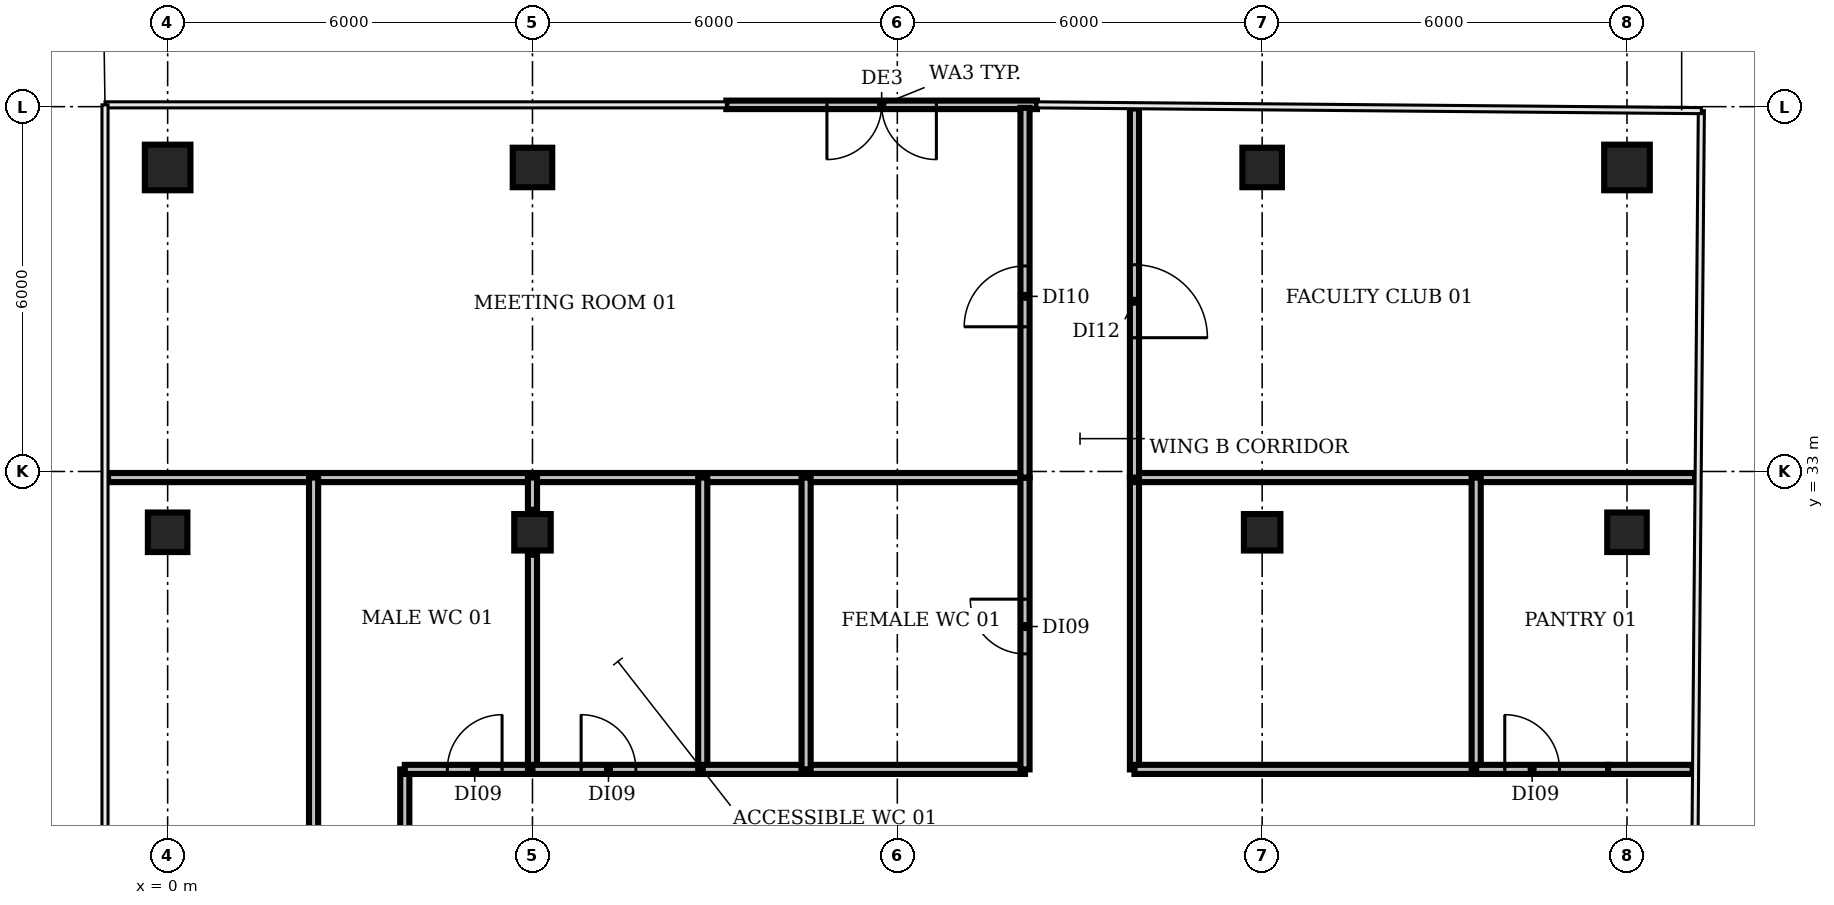
"""IFC4 building model, lengths in metres.
Left out: names, types, materials, properties, quantities, classifications, styles, units other than length and angle.
Written with IfcOpenShell. Run it as: python <this file> out.ifc"""

import sys

from ifc_helpers import new_model, si_unit, direction, frame, frame_2d, origin, origin_2d, place, context, subcontext, project, spatial, rectangle, circle, extrude, element, fill, save


model = new_model("IFC4")
c1 = context("Model", 3, precision=1e-05, world=origin(), true_north=direction((0.0, 1.0)))
c2 = subcontext(c1, "Body", "Model", "MODEL_VIEW")
j1 = project(units=[si_unit("LENGTHUNIT", "METRE"), si_unit("PLANEANGLEUNIT", "RADIAN")], contexts=[c1])
p1 = place(None, origin())
s1 = spatial("IfcSite", under=j1, at=p1, CompositionType="ELEMENT")
p2 = place(p1, origin())
s2 = spatial("IfcBuilding", under=s1, at=p2, CompositionType="ELEMENT")
p3 = place(p2, frame((0.0, 0.0, 335.6)))
s3 = spatial("IfcBuildingStorey", under=s2, at=p3, CompositionType="ELEMENT", Elevation=335.6)
p4 = place(p3, frame((0.0, 32.0, 0.0), z_axis=(0.0, 0.0, 1.0), x_axis=(1.0, 0.0, 0.0)))
e1 = element("IfcColumn", 1, at=p4, inside=s3, PredefinedType="COLUMN", context=c2, shape_type="SweptSolid", body=[
    extrude(rectangle(XDim=0.65, YDim=0.65, at=origin_2d()), origin(), (0.0, 0.0, 1.0), 3.9),
])
p5 = place(p3, frame((0.0, 38.0, 0.0), z_axis=(0.0, 0.0, 1.0), x_axis=(1.0, 0.0, 0.0)))
e2 = element("IfcColumn", 2, at=p5, inside=s3, PredefinedType="COLUMN", context=c2, shape_type="SweptSolid", body=[
    extrude(circle(Radius=0.375, at=origin_2d()), origin(), (0.0, 0.0, 1.0), 3.9),
])
p6 = place(p3, frame((6.0, 32.0, 0.0), z_axis=(0.0, 0.0, 1.0), x_axis=(1.0, 0.0, 0.0)))
e3 = element("IfcColumn", 3, at=p6, inside=s3, PredefinedType="COLUMN", context=c2, shape_type="SweptSolid", body=[
    extrude(rectangle(XDim=0.6, YDim=0.6, at=origin_2d()), origin(), (0.0, 0.0, 1.0), 3.9),
])
p7 = place(p3, frame((6.0, 38.0, 0.0), z_axis=(0.0, 0.0, 1.0), x_axis=(1.0, 0.0, 0.0)))
e4 = element("IfcColumn", 4, at=p7, inside=s3, PredefinedType="COLUMN", context=c2, shape_type="SweptSolid", body=[
    extrude(rectangle(XDim=0.65, YDim=0.65, at=origin_2d()), origin(), (0.0, 0.0, 1.0), 3.9),
])
p8 = place(p3, frame((18.0, 32.0, 0.0), z_axis=(0.0, 0.0, 1.0), x_axis=(1.0, 0.0, 0.0)))
e5 = element("IfcColumn", 5, at=p8, inside=s3, PredefinedType="COLUMN", context=c2, shape_type="SweptSolid", body=[
    extrude(rectangle(XDim=0.6, YDim=0.6, at=origin_2d()), origin(), (0.0, 0.0, 1.0), 3.9),
])
for number, where, z_axis, x_axis in (
    (6, (18.0, 38.0, 0.0), (0.0, 0.0, 1.0), (1.0, 0.0, 0.0)),
    (7, (24.0, 32.0, 0.0), (0.0, 0.0, 1.0), (1.0, 0.0, 0.0)),
):
    element("IfcColumn", number, at=place(p3, frame(where, z_axis=z_axis, x_axis=x_axis)), inside=s3, PredefinedType="COLUMN", context=c2, shape_type="SweptSolid", body=[
        extrude(rectangle(XDim=0.65, YDim=0.65, at=origin_2d()), origin(), (0.0, 0.0, 1.0), 3.9),
    ])
p9 = place(p3, frame((24.0, 38.0, 0.0), z_axis=(0.0, 0.0, 1.0), x_axis=(1.0, 0.0, 0.0)))
e8 = element("IfcColumn", 8, at=p9, inside=s3, PredefinedType="COLUMN", context=c2, shape_type="SweptSolid", body=[
    extrude(circle(Radius=0.375, at=origin_2d()), origin(), (0.0, 0.0, 1.0), 3.9),
])
p10 = place(p3, frame((14.297, 39.03, 0.0), z_axis=(0.0, 0.0, 1.0), x_axis=(-1.0, 0.0, 0.0)))
e9 = element("IfcWall", 9, at=p10, inside=s3, PredefinedType="SOLIDWALL", context=c2, shape_type="SweptSolid", body=[
    extrude(rectangle(XDim=5.109, YDim=0.14, at=frame_2d((2.555, 0.0))), origin(), (0.0, 0.0, 1.0), 3.9),
])
p11 = place(p10, frame((1.655, 0.0, 0.0)))
e10 = element("IfcOpeningElement", 10, at=p11, cuts=e9, PredefinedType="OPENING", context=c2, shape_type="SweptSolid", body=[
    extrude(rectangle(XDim=1.8, YDim=2.4, at=frame_2d((0.9, 1.2))), frame((0.0, 0.08, 0.0), z_axis=(0.0, -1.0, 0.0), x_axis=(1.0, 0.0, 0.0)), (0.0, 0.0, 1.0), 0.16),
])
p12 = place(p3, frame((-0.98, 32.9, 0.0), z_axis=(0.0, 0.0, 1.0), x_axis=(1.0, 0.0, 0.0)))
e11 = element("IfcWall", 11, at=p12, inside=s3, PredefinedType="PARTITIONING", context=c2, shape_type="SweptSolid", body=[
    extrude(rectangle(XDim=15.08, YDim=0.15, at=frame_2d((7.54, 0.0))), origin(), (0.0, 0.0, 1.0), 2.95),
])
p13 = place(p3, frame((2.4, 26.9, 0.0), z_axis=(0.0, 0.0, 1.0), x_axis=(0.0, 1.0, 0.0)))
e12 = element("IfcWall", 12, at=p13, inside=s3, PredefinedType="PARTITIONING", context=c2, shape_type="SweptSolid", body=[
    extrude(rectangle(XDim=6.0, YDim=0.15, at=frame_2d((3.0, 0.0))), origin(), (0.0, 0.0, 1.0), 2.95),
])
p14 = place(p3, frame((3.9, 22.5, 0.0), z_axis=(0.0, 0.0, 1.0), x_axis=(0.0, 1.0, 0.0)))
e13 = element("IfcWall", 13, at=p14, inside=s3, PredefinedType="PARTITIONING", context=c2, shape_type="SweptSolid", body=[
    extrude(rectangle(XDim=5.6, YDim=0.15, at=frame_2d((2.8, 0.0))), origin(), (0.0, 0.0, 1.0), 2.95),
])
p15 = place(p3, frame((3.9, 28.1, 0.0), z_axis=(0.0, 0.0, 1.0), x_axis=(1.0, 0.0, 0.0)))
e14 = element("IfcWall", 14, at=p15, inside=s3, PredefinedType="PARTITIONING", context=c2, shape_type="SweptSolid", body=[
    extrude(rectangle(XDim=2.1, YDim=0.15, at=frame_2d((1.05, 0.0))), origin(), (0.0, 0.0, 1.0), 2.95),
])
p16 = place(p15, frame((0.7, 0.0, 0.0)))
e15 = element("IfcOpeningElement", 15, at=p16, cuts=e14, PredefinedType="OPENING", context=c2, shape_type="SweptSolid", body=[
    extrude(rectangle(XDim=0.9, YDim=2.1, at=frame_2d((0.45, 1.05))), frame((0.0, 0.085, 0.0), z_axis=(0.0, -1.0, 0.0), x_axis=(1.0, 0.0, 0.0)), (0.0, 0.0, 1.0), 0.17),
])
p17 = place(p3, frame((6.0, 28.1, 0.0), z_axis=(0.0, 0.0, 1.0), x_axis=(0.0, 1.0, 0.0)))
e16 = element("IfcWall", 16, at=p17, inside=s3, PredefinedType="PARTITIONING", context=c2, shape_type="SweptSolid", body=[
    extrude(rectangle(XDim=3.53, YDim=0.15, at=frame_2d((1.765, 0.0))), origin(), (0.0, 0.0, 1.0), 2.95),
])
p18 = place(p3, frame((6.0, 28.1, 0.0), z_axis=(0.0, 0.0, 1.0), x_axis=(1.0, 0.0, 0.0)))
e17 = element("IfcWall", 17, at=p18, inside=s3, PredefinedType="PARTITIONING", context=c2, shape_type="SweptSolid", body=[
    extrude(rectangle(XDim=2.8, YDim=0.15, at=frame_2d((1.4, 0.0))), origin(), (0.0, 0.0, 1.0), 2.95),
])
p19 = place(p18, frame((0.8, 0.0, 0.0)))
e18 = element("IfcOpeningElement", 18, at=p19, cuts=e17, PredefinedType="OPENING", context=c2, shape_type="SweptSolid", body=[
    extrude(rectangle(XDim=0.9, YDim=2.1, at=frame_2d((0.45, 1.05))), frame((0.0, 0.085, 0.0), z_axis=(0.0, -1.0, 0.0), x_axis=(1.0, 0.0, 0.0)), (0.0, 0.0, 1.0), 0.17),
])
p20 = place(p3, frame((6.0, 31.736, 0.0), z_axis=(0.0, 0.0, 1.0), x_axis=(0.0, 1.0, 0.0)))
e19 = element("IfcWall", 19, at=p20, inside=s3, PredefinedType="PARTITIONING", context=c2, shape_type="SweptSolid", body=[
    extrude(rectangle(XDim=0.529, YDim=0.15, at=frame_2d((0.264, 0.0))), origin(), (0.0, 0.0, 1.0), 2.95),
])
p21 = place(p3, frame((6.0, 32.37, 0.0), z_axis=(0.0, 0.0, 1.0), x_axis=(0.0, 1.0, 0.0)))
e20 = element("IfcWall", 20, at=p21, inside=s3, PredefinedType="PARTITIONING", context=c2, shape_type="SweptSolid", body=[
    extrude(rectangle(XDim=0.53, YDim=0.15, at=frame_2d((0.265, 0.0))), origin(), (0.0, 0.0, 1.0), 2.95),
])
p22 = place(p3, frame((8.8, 28.1, 0.0), z_axis=(0.0, 0.0, 1.0), x_axis=(0.0, 1.0, 0.0)))
e21 = element("IfcWall", 21, at=p22, inside=s3, PredefinedType="PARTITIONING", context=c2, shape_type="SweptSolid", body=[
    extrude(rectangle(XDim=4.8, YDim=0.15, at=frame_2d((2.4, 0.0))), origin(), (0.0, 0.0, 1.0), 2.95),
])
p23 = place(p3, frame((8.8, 28.1, 0.0), z_axis=(0.0, 0.0, 1.0), x_axis=(1.0, 0.0, 0.0)))
e22 = element("IfcWall", 22, at=p23, inside=s3, PredefinedType="PARTITIONING", context=c2, shape_type="SweptSolid", body=[
    extrude(rectangle(XDim=5.3, YDim=0.15, at=frame_2d((2.65, 0.0))), origin(), (0.0, 0.0, 1.0), 2.95),
])
p24 = place(p3, frame((10.5, 28.1, 0.0), z_axis=(0.0, 0.0, 1.0), x_axis=(0.0, 1.0, 0.0)))
e23 = element("IfcWall", 23, at=p24, inside=s3, PredefinedType="PARTITIONING", context=c2, shape_type="SweptSolid", body=[
    extrude(rectangle(XDim=4.8, YDim=0.15, at=frame_2d((2.4, 0.0))), origin(), (0.0, 0.0, 1.0), 2.95),
])
p25 = place(p3, frame((14.1, 28.1, 0.0), z_axis=(0.0, 0.0, 1.0), x_axis=(0.0, 1.0, 0.0)))
e24 = element("IfcWall", 24, at=p25, inside=s3, PredefinedType="PARTITIONING", context=c2, shape_type="SweptSolid", body=[
    extrude(rectangle(XDim=4.8, YDim=0.15, at=frame_2d((2.4, 0.0))), origin(), (0.0, 0.0, 1.0), 2.95),
])
p26 = place(p25, frame((1.9, 0.0, 0.0)))
e25 = element("IfcOpeningElement", 25, at=p26, cuts=e24, PredefinedType="OPENING", context=c2, shape_type="SweptSolid", body=[
    extrude(rectangle(XDim=0.9, YDim=2.1, at=frame_2d((0.45, 1.05))), frame((0.0, 0.085, 0.0), z_axis=(0.0, -1.0, 0.0), x_axis=(1.0, 0.0, 0.0)), (0.0, 0.0, 1.0), 0.17),
])
p27 = place(p3, frame((14.1, 32.9, 0.0), z_axis=(0.0, 0.0, 1.0), x_axis=(0.0, 1.0, 0.0)))
e26 = element("IfcWall", 26, at=p27, inside=s3, PredefinedType="PARTITIONING", context=c2, shape_type="SweptSolid", body=[
    extrude(rectangle(XDim=6.08, YDim=0.15, at=frame_2d((3.04, 0.0))), origin(), (0.0, 0.0, 1.0), 2.95),
])
p28 = place(p27, frame((2.48, 0.0, 0.0)))
e27 = element("IfcOpeningElement", 27, at=p28, cuts=e26, PredefinedType="OPENING", context=c2, shape_type="SweptSolid", body=[
    extrude(rectangle(XDim=1.0, YDim=2.1, at=frame_2d((0.5, 1.05))), frame((0.0, 0.085, 0.0), z_axis=(0.0, -1.0, 0.0), x_axis=(1.0, 0.0, 0.0)), (0.0, 0.0, 1.0), 0.17),
])
p29 = place(p3, frame((15.9, 28.1, 0.0), z_axis=(0.0, 0.0, 1.0), x_axis=(0.0, 1.0, 0.0)))
e28 = element("IfcWall", 28, at=p29, inside=s3, PredefinedType="PARTITIONING", context=c2, shape_type="SweptSolid", body=[
    extrude(rectangle(XDim=4.8, YDim=0.15, at=frame_2d((2.4, 0.0))), origin(), (0.0, 0.0, 1.0), 2.95),
])
p30 = place(p3, frame((15.9, 28.1, 0.0), z_axis=(0.0, 0.0, 1.0), x_axis=(1.0, 0.0, 0.0)))
e29 = element("IfcWall", 29, at=p30, inside=s3, PredefinedType="PARTITIONING", context=c2, shape_type="SweptSolid", body=[
    extrude(rectangle(XDim=5.62, YDim=0.15, at=frame_2d((2.81, 0.0))), origin(), (0.0, 0.0, 1.0), 2.95),
])
p31 = place(p3, frame((15.9, 32.9, 0.0), z_axis=(0.0, 0.0, 1.0), x_axis=(1.0, 0.0, 0.0)))
e30 = element("IfcWall", 30, at=p31, inside=s3, PredefinedType="PARTITIONING", context=c2, shape_type="SweptSolid", body=[
    extrude(rectangle(XDim=9.22, YDim=0.15, at=frame_2d((4.61, 0.0))), origin(), (0.0, 0.0, 1.0), 2.95),
])
p32 = place(p3, frame((15.9, 38.97, 0.0), z_axis=(0.0, 0.0, 1.0), x_axis=(0.0, -1.0, 0.0)))
e31 = element("IfcWall", 31, at=p32, inside=s3, PredefinedType="PARTITIONING", context=c2, shape_type="SweptSolid", body=[
    extrude(rectangle(XDim=6.07, YDim=0.15, at=frame_2d((3.035, 0.0))), origin(), (0.0, 0.0, 1.0), 2.95),
])
p33 = place(p32, frame((2.57, 0.0, 0.0)))
e32 = element("IfcOpeningElement", 32, at=p33, cuts=e31, PredefinedType="OPENING", context=c2, shape_type="SweptSolid", body=[
    extrude(rectangle(XDim=1.2, YDim=2.1, at=frame_2d((0.6, 1.05))), frame((0.0, 0.085, 0.0), z_axis=(0.0, -1.0, 0.0), x_axis=(1.0, 0.0, 0.0)), (0.0, 0.0, 1.0), 0.17),
])
p34 = place(p3, frame((21.52, 28.1, 0.0), z_axis=(0.0, 0.0, 1.0), x_axis=(0.0, 1.0, 0.0)))
e33 = element("IfcWall", 33, at=p34, inside=s3, PredefinedType="PARTITIONING", context=c2, shape_type="SweptSolid", body=[
    extrude(rectangle(XDim=4.8, YDim=0.15, at=frame_2d((2.4, 0.0))), origin(), (0.0, 0.0, 1.0), 2.95),
])
p35 = place(p3, frame((21.52, 28.1, 0.0), z_axis=(0.0, 0.0, 1.0), x_axis=(1.0, 0.0, 0.0)))
e34 = element("IfcWall", 34, at=p35, inside=s3, PredefinedType="PARTITIONING", context=c2, shape_type="SweptSolid", body=[
    extrude(rectangle(XDim=2.17, YDim=0.15, at=frame_2d((1.085, 0.0))), origin(), (0.0, 0.0, 1.0), 2.95),
])
p36 = place(p35, frame((0.47, 0.0, 0.0)))
e35 = element("IfcOpeningElement", 35, at=p36, cuts=e34, PredefinedType="OPENING", context=c2, shape_type="SweptSolid", body=[
    extrude(rectangle(XDim=0.9, YDim=2.1, at=frame_2d((0.45, 1.05))), frame((0.0, 0.085, 0.0), z_axis=(0.0, -1.0, 0.0), x_axis=(1.0, 0.0, 0.0)), (0.0, 0.0, 1.0), 0.17),
])
p37 = place(p3, frame((23.69, 28.1, 0.0), z_axis=(0.0, 0.0, 1.0), x_axis=(1.0, 0.0, 0.0)))
e36 = element("IfcWall", 36, at=p37, inside=s3, PredefinedType="PARTITIONING", context=c2, shape_type="SweptSolid", body=[
    extrude(rectangle(XDim=1.39, YDim=0.15, at=frame_2d((0.695, 0.0))), origin(), (0.0, 0.0, 1.0), 2.95),
])
p38 = place(p11, origin())
e37 = element("IfcDoor", 37, at=p38, inside=s3, OperationType="DOUBLE_DOOR_DOUBLE_SWING", PredefinedType="DOOR", context=c2, shape_type="SweptSolid", body=[
    extrude(rectangle(XDim=1.8, YDim=2.4, at=frame_2d((0.9, 1.2))), frame((0.0, 0.025, 0.0), z_axis=(0.0, -1.0, 0.0), x_axis=(1.0, 0.0, 0.0)), (0.0, 0.0, 1.0), 0.05),
])
fill(e10, e37)
p39 = place(p16, origin())
e38 = element("IfcDoor", 38, at=p39, inside=s3, OperationType="SINGLE_SWING_RIGHT", PredefinedType="DOOR", context=c2, shape_type="SweptSolid", body=[
    extrude(rectangle(XDim=0.9, YDim=2.1, at=frame_2d((0.45, 1.05))), frame((0.0, 0.025, 0.0), z_axis=(0.0, -1.0, 0.0), x_axis=(1.0, 0.0, 0.0)), (0.0, 0.0, 1.0), 0.05),
])
fill(e15, e38)
p40 = place(p19, origin())
e39 = element("IfcDoor", 39, at=p40, inside=s3, OperationType="SINGLE_SWING_LEFT", PredefinedType="DOOR", context=c2, shape_type="SweptSolid", body=[
    extrude(rectangle(XDim=0.9, YDim=2.1, at=frame_2d((0.45, 1.05))), frame((0.0, 0.025, 0.0), z_axis=(0.0, -1.0, 0.0), x_axis=(1.0, 0.0, 0.0)), (0.0, 0.0, 1.0), 0.05),
])
fill(e18, e39)
p41 = place(p26, origin())
e40 = element("IfcDoor", 40, at=p41, inside=s3, OperationType="SINGLE_SWING_RIGHT", PredefinedType="DOOR", context=c2, shape_type="SweptSolid", body=[
    extrude(rectangle(XDim=0.9, YDim=2.1, at=frame_2d((0.45, 1.05))), frame((0.0, 0.025, 0.0), z_axis=(0.0, -1.0, 0.0), x_axis=(1.0, 0.0, 0.0)), (0.0, 0.0, 1.0), 0.05),
])
fill(e25, e40)
p42 = place(p28, origin())
e41 = element("IfcDoor", 41, at=p42, inside=s3, OperationType="SINGLE_SWING_LEFT", PredefinedType="DOOR", context=c2, shape_type="SweptSolid", body=[
    extrude(rectangle(XDim=1.0, YDim=2.1, at=frame_2d((0.5, 1.05))), frame((0.0, 0.025, 0.0), z_axis=(0.0, -1.0, 0.0), x_axis=(1.0, 0.0, 0.0)), (0.0, 0.0, 1.0), 0.05),
])
fill(e27, e41)
p43 = place(p33, origin())
e42 = element("IfcDoor", 42, at=p43, inside=s3, OperationType="SINGLE_SWING_RIGHT", PredefinedType="DOOR", context=c2, shape_type="SweptSolid", body=[
    extrude(rectangle(XDim=1.2, YDim=2.1, at=frame_2d((0.6, 1.05))), frame((0.0, 0.025, 0.0), z_axis=(0.0, -1.0, 0.0), x_axis=(1.0, 0.0, 0.0)), (0.0, 0.0, 1.0), 0.05),
])
fill(e32, e42)
p44 = place(p36, origin())
e43 = element("IfcDoor", 43, at=p44, inside=s3, OperationType="SINGLE_SWING_LEFT", PredefinedType="DOOR", context=c2, shape_type="SweptSolid", body=[
    extrude(rectangle(XDim=0.9, YDim=2.1, at=frame_2d((0.45, 1.05))), frame((0.0, 0.025, 0.0), z_axis=(0.0, -1.0, 0.0), x_axis=(1.0, 0.0, 0.0)), (0.0, 0.0, 1.0), 0.05),
])
fill(e35, e43)
save(model, sys.argv[1])
